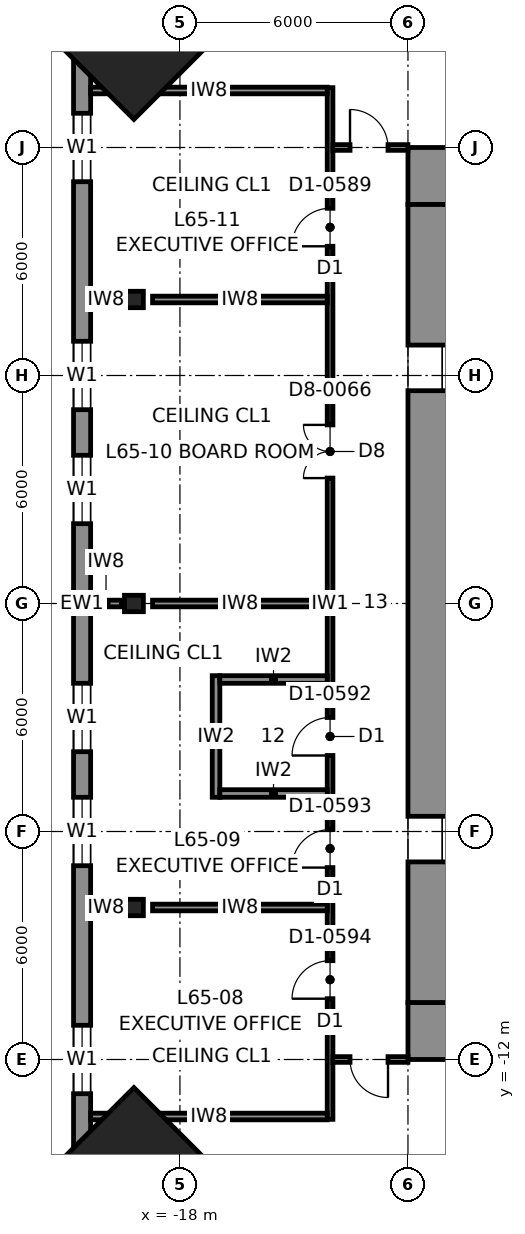
"""IFC4 building model, lengths in metres.
Left out: names, types, materials, properties, quantities, classifications, styles, units other than length and angle.
Written with IfcOpenShell. Run it as: python <this file> out.ifc"""

import sys

from ifc_helpers import new_model, si_unit, direction, frame, frame_2d, origin, origin_2d, place, context, subcontext, project, spatial, rectangle, i_section, extrude, element, fill, save


model = new_model("IFC4")
c1 = context("Model", 3, precision=1e-05, world=origin(), true_north=direction((0.0, 1.0)))
c2 = subcontext(c1, "Body", "Model", "MODEL_VIEW")
j1 = project(units=[si_unit("LENGTHUNIT", "METRE"), si_unit("PLANEANGLEUNIT", "RADIAN")], contexts=[c1])
p1 = place(None, origin())
s1 = spatial("IfcSite", under=j1, at=p1, CompositionType="ELEMENT")
p2 = place(p1, origin())
s2 = spatial("IfcBuilding", under=s1, at=p2, CompositionType="ELEMENT")
p3 = place(p2, frame((0.0, 0.0, 289.8)))
s3 = spatial("IfcBuildingStorey", under=s2, at=p3, CompositionType="ELEMENT", Elevation=289.8)
for number, where, z_axis, x_axis in (
    (1, (-19.211, -14.861, 0.0), (0.04, 0.04, 0.998), (-0.708, 0.707, 0.0)),
    (2, (-19.211, 14.861, 0.0), (0.04, -0.04, 0.998), (0.708, 0.707, 0.0)),
):
    element("IfcColumn", number, at=place(p3, frame(where, z_axis=z_axis, x_axis=x_axis)), inside=s3, PredefinedType="COLUMN", context=c2, shape_type="SweptSolid", body=[
        extrude(rectangle(XDim=3.0, YDim=3.0, at=origin_2d()), origin(), (0.0, 0.0, 1.0), 4.007),
    ])
for number, where, z_axis, x_axis in (
    (3, (-19.211, 0.0, 0.0), (0.04, 0.0, 0.999), (0.0, 1.0, 0.0)),
    (4, (-19.211, 8.0, 0.0), (0.04, 0.0, 0.999), (0.0, 1.0, 0.0)),
    (5, (-19.211, -8.0, 0.0), (0.04, 0.0, 0.999), (0.0, 1.0, 0.0)),
):
    element("IfcColumn", number, at=place(p3, frame(where, z_axis=z_axis, x_axis=x_axis)), inside=s3, PredefinedType="COLUMN", context=c2, shape_type="SweptSolid", body=[
        extrude(i_section(OverallWidth=0.432, OverallDepth=0.498, WebThickness=0.056, FlangeThickness=0.089, at=origin_2d()), origin(), (0.0, 0.0, 1.0), 4.003),
    ])
for number, where, z_axis, x_axis in (
    (6, (-12.0, 11.25, 0.0), (0.0, 0.0, 1.0), (1.0, 0.0, 0.0)),
    (7, (12.0, -11.25, 0.0), (0.0, 0.0, 1.0), (-1.0, 0.0, 0.0)),
):
    element("IfcWall", number, at=place(p3, frame(where, z_axis=z_axis, x_axis=x_axis)), inside=s3, PredefinedType="SHEAR", context=c2, shape_type="SweptSolid", body=[
        extrude(rectangle(XDim=24.0, YDim=1.5, at=frame_2d((12.0, 0.0))), origin(), (0.0, 0.0, 1.0), 4.0),
    ])
p4 = place(p3, frame((-11.25, -10.5, 0.0), z_axis=(0.0, 0.0, 1.0), x_axis=(0.0, 1.0, 0.0)))
e8 = element("IfcWall", 8, at=p4, inside=s3, PredefinedType="SHEAR", context=c2, shape_type="SweptSolid", body=[
    extrude(rectangle(XDim=21.0, YDim=1.5, at=frame_2d((10.5, 0.0))), origin(), (0.0, 0.0, 1.0), 4.0),
])
p5 = place(p4, frame((16.1, 0.0, 0.0)))
e9 = element("IfcOpeningElement", 9, at=p5, cuts=e8, PredefinedType="OPENING", context=c2, shape_type="SweptSolid", body=[
    extrude(rectangle(XDim=1.2, YDim=2.3, at=frame_2d((0.6, 1.15))), frame((0.0, 0.76, 0.0), z_axis=(0.0, -1.0, 0.0), x_axis=(1.0, 0.0, 0.0)), (0.0, 0.0, 1.0), 1.52),
])
p6 = place(p4, frame((3.7, 0.0, 0.0)))
e10 = element("IfcOpeningElement", 10, at=p6, cuts=e8, PredefinedType="OPENING", context=c2, shape_type="SweptSolid", body=[
    extrude(rectangle(XDim=1.2, YDim=2.3, at=frame_2d((0.6, 1.15))), frame((0.0, 0.76, 0.0), z_axis=(0.0, -1.0, 0.0), x_axis=(1.0, 0.0, 0.0)), (0.0, 0.0, 1.0), 1.52),
])
p7 = place(p3, frame((-20.575, 16.3, 0.0), z_axis=(0.0, 0.0, 1.0), x_axis=(0.0, -1.0, 0.0)))
e11 = element("IfcWall", 11, at=p7, inside=s3, PredefinedType="SOLIDWALL", context=c2, shape_type="SweptSolid", body=[
    extrude(rectangle(XDim=32.6, YDim=0.45, at=frame_2d((16.3, 0.0))), origin(), (0.0, 0.0, 1.0), 3.83),
])
p8 = place(p7, frame((3.4, 0.0, 0.7)))
e12 = element("IfcOpeningElement", 12, at=p8, cuts=e11, PredefinedType="OPENING", context=c2, shape_type="SweptSolid", body=[
    extrude(rectangle(XDim=1.8, YDim=2.6, at=frame_2d((0.9, 1.3))), frame((0.0, 0.235, 0.0), z_axis=(0.0, -1.0, 0.0), x_axis=(1.0, 0.0, 0.0)), (0.0, 0.0, 1.0), 0.47),
])
p9 = place(p7, frame((9.4, 0.0, 0.7)))
e13 = element("IfcOpeningElement", 13, at=p9, cuts=e11, PredefinedType="OPENING", context=c2, shape_type="SweptSolid", body=[
    extrude(rectangle(XDim=1.8, YDim=2.6, at=frame_2d((0.9, 1.3))), frame((0.0, 0.235, 0.0), z_axis=(0.0, -1.0, 0.0), x_axis=(1.0, 0.0, 0.0)), (0.0, 0.0, 1.0), 0.47),
])
p10 = place(p7, frame((12.4, 0.0, 0.7)))
e14 = element("IfcOpeningElement", 14, at=p10, cuts=e11, PredefinedType="OPENING", context=c2, shape_type="SweptSolid", body=[
    extrude(rectangle(XDim=1.8, YDim=2.6, at=frame_2d((0.9, 1.3))), frame((0.0, 0.235, 0.0), z_axis=(0.0, -1.0, 0.0), x_axis=(1.0, 0.0, 0.0)), (0.0, 0.0, 1.0), 0.47),
])
p11 = place(p7, frame((18.4, 0.0, 0.7)))
e15 = element("IfcOpeningElement", 15, at=p11, cuts=e11, PredefinedType="OPENING", context=c2, shape_type="SweptSolid", body=[
    extrude(rectangle(XDim=1.8, YDim=2.6, at=frame_2d((0.9, 1.3))), frame((0.0, 0.235, 0.0), z_axis=(0.0, -1.0, 0.0), x_axis=(1.0, 0.0, 0.0)), (0.0, 0.0, 1.0), 0.47),
])
p12 = place(p7, frame((21.4, 0.0, 0.7)))
e16 = element("IfcOpeningElement", 16, at=p12, cuts=e11, PredefinedType="OPENING", context=c2, shape_type="SweptSolid", body=[
    extrude(rectangle(XDim=1.8, YDim=2.6, at=frame_2d((0.9, 1.3))), frame((0.0, 0.235, 0.0), z_axis=(0.0, -1.0, 0.0), x_axis=(1.0, 0.0, 0.0)), (0.0, 0.0, 1.0), 0.47),
])
p13 = place(p7, frame((27.4, 0.0, 0.7)))
e17 = element("IfcOpeningElement", 17, at=p13, cuts=e11, PredefinedType="OPENING", context=c2, shape_type="SweptSolid", body=[
    extrude(rectangle(XDim=1.8, YDim=2.6, at=frame_2d((0.9, 1.3))), frame((0.0, 0.235, 0.0), z_axis=(0.0, -1.0, 0.0), x_axis=(1.0, 0.0, 0.0)), (0.0, 0.0, 1.0), 0.47),
])
p14 = place(p3, frame((-14.05, 13.575, 0.0), z_axis=(0.0, 0.0, 1.0), x_axis=(0.0, -1.0, 0.0)))
e18 = element("IfcWall", 18, at=p14, inside=s3, PredefinedType="PARTITIONING", context=c2, shape_type="SweptSolid", body=[
    extrude(rectangle(XDim=27.15, YDim=0.15, at=frame_2d((13.575, 0.0))), origin(), (0.0, 0.0, 1.0), 3.83),
])
p15 = place(p14, frame((22.975, 0.0, 0.0)))
e19 = element("IfcOpeningElement", 19, at=p15, cuts=e18, PredefinedType="OPENING", context=c2, shape_type="SweptSolid", body=[
    extrude(rectangle(XDim=1.0, YDim=2.3, at=frame_2d((0.5, 1.15))), frame((0.0, 0.085, 0.0), z_axis=(0.0, -1.0, 0.0), x_axis=(1.0, 0.0, 0.0)), (0.0, 0.0, 1.0), 0.17),
])
p16 = place(p14, frame((19.525, 0.0, 0.0)))
e20 = element("IfcOpeningElement", 20, at=p16, cuts=e18, PredefinedType="OPENING", context=c2, shape_type="SweptSolid", body=[
    extrude(rectangle(XDim=1.0, YDim=2.3, at=frame_2d((0.5, 1.15))), frame((0.0, 0.085, 0.0), z_axis=(0.0, -1.0, 0.0), x_axis=(1.0, 0.0, 0.0)), (0.0, 0.0, 1.0), 0.17),
])
p17 = place(p14, frame((8.875, 0.0, 0.0)))
e21 = element("IfcOpeningElement", 21, at=p17, cuts=e18, PredefinedType="OPENING", context=c2, shape_type="SweptSolid", body=[
    extrude(rectangle(XDim=1.4, YDim=2.3, at=frame_2d((0.7, 1.15))), frame((0.0, 0.085, 0.0), z_axis=(0.0, -1.0, 0.0), x_axis=(1.0, 0.0, 0.0)), (0.0, 0.0, 1.0), 0.17),
])
p18 = place(p14, frame((3.175, 0.0, 0.0)))
e22 = element("IfcOpeningElement", 22, at=p18, cuts=e18, PredefinedType="OPENING", context=c2, shape_type="SweptSolid", body=[
    extrude(rectangle(XDim=1.0, YDim=2.3, at=frame_2d((0.5, 1.15))), frame((0.0, 0.085, 0.0), z_axis=(0.0, -1.0, 0.0), x_axis=(1.0, 0.0, 0.0)), (0.0, 0.0, 1.0), 0.17),
])
p19 = place(p14, frame((16.575, 0.0, 0.0)))
e23 = element("IfcOpeningElement", 23, at=p19, cuts=e18, PredefinedType="OPENING", context=c2, shape_type="SweptSolid", body=[
    extrude(rectangle(XDim=1.0, YDim=2.3, at=frame_2d((0.5, 1.15))), frame((0.0, 0.085, 0.0), z_axis=(0.0, -1.0, 0.0), x_axis=(1.0, 0.0, 0.0)), (0.0, 0.0, 1.0), 0.17),
])
p20 = place(p3, frame((-13.975, 12.0, 0.0), z_axis=(0.0, 0.0, 1.0), x_axis=(1.0, 0.0, 0.0)))
e24 = element("IfcWall", 24, at=p20, inside=s3, PredefinedType="PARTITIONING", context=c2, shape_type="SweptSolid", body=[
    extrude(rectangle(XDim=1.975, YDim=0.15, at=frame_2d((0.988, 0.0))), origin(), (0.0, 0.0, 1.0), 3.83),
])
p21 = place(p20, frame((0.45, 0.0, 0.0)))
e25 = element("IfcOpeningElement", 25, at=p21, cuts=e24, PredefinedType="OPENING", context=c2, shape_type="SweptSolid", body=[
    extrude(rectangle(XDim=1.0, YDim=2.3, at=frame_2d((0.5, 1.15))), frame((0.0, 0.085, 0.0), z_axis=(0.0, -1.0, 0.0), x_axis=(1.0, 0.0, 0.0)), (0.0, 0.0, 1.0), 0.17),
])
p22 = place(p3, frame((-12.0, -12.0, 0.0), z_axis=(0.0, 0.0, 1.0), x_axis=(-1.0, 0.0, 0.0)))
e26 = element("IfcWall", 26, at=p22, inside=s3, PredefinedType="PARTITIONING", context=c2, shape_type="SweptSolid", body=[
    extrude(rectangle(XDim=1.975, YDim=0.15, at=frame_2d((0.988, 0.0))), origin(), (0.0, 0.0, 1.0), 3.83),
])
p23 = place(p22, frame((0.525, 0.0, 0.0)))
e27 = element("IfcOpeningElement", 27, at=p23, cuts=e26, PredefinedType="OPENING", context=c2, shape_type="SweptSolid", body=[
    extrude(rectangle(XDim=1.0, YDim=2.3, at=frame_2d((0.5, 1.15))), frame((0.0, 0.085, 0.0), z_axis=(0.0, -1.0, 0.0), x_axis=(1.0, 0.0, 0.0)), (0.0, 0.0, 1.0), 0.17),
])
for number, where, z_axis, x_axis in (
    (28, (-20.35, 13.5, 0.0), (0.0, 0.0, 1.0), (1.0, 0.0, 0.0)),
    (29, (-14.125, -13.5, 0.0), (0.0, 0.0, 1.0), (-1.0, 0.0, 0.0)),
):
    element("IfcWall", number, at=place(p3, frame(where, z_axis=z_axis, x_axis=x_axis)), inside=s3, PredefinedType="PARTITIONING", context=c2, shape_type="SweptSolid", body=[
        extrude(rectangle(XDim=6.225, YDim=0.175, at=frame_2d((3.113, 0.0))), origin(), (0.0, 0.0, 1.0), 3.83),
    ])
p24 = place(p3, frame((-14.125, -8.0, 0.0), z_axis=(0.0, 0.0, 1.0), x_axis=(-1.0, 0.0, 0.0)))
e30 = element("IfcWall", 30, at=p24, inside=s3, PredefinedType="PARTITIONING", context=c2, shape_type="SweptSolid", body=[
    extrude(rectangle(XDim=4.595, YDim=0.175, at=frame_2d((2.298, 0.0))), origin(), (0.0, 0.0, 1.0), 3.016),
])
p25 = place(p3, frame((-19.541, -8.0, 0.0), z_axis=(0.0, 0.0, 1.0), x_axis=(-1.0, 0.0, 0.0)))
e31 = element("IfcWall", 31, at=p25, inside=s3, PredefinedType="PARTITIONING", context=c2, shape_type="SweptSolid", body=[
    extrude(rectangle(XDim=0.809, YDim=0.175, at=frame_2d((0.405, 0.0))), origin(), (0.0, 0.0, 1.0), 3.83),
])
p26 = place(p3, frame((-14.125, 0.0, 0.0), z_axis=(0.0, 0.0, 1.0), x_axis=(-1.0, 0.0, 0.0)))
e32 = element("IfcWall", 32, at=p26, inside=s3, PredefinedType="PARTITIONING", context=c2, shape_type="SweptSolid", body=[
    extrude(rectangle(XDim=4.595, YDim=0.175, at=frame_2d((2.298, 0.0))), origin(), (0.0, 0.0, 1.0), 3.016),
])
p27 = place(p3, frame((-19.541, 0.0, 0.0), z_axis=(0.0, 0.0, 1.0), x_axis=(-1.0, 0.0, 0.0)))
e33 = element("IfcWall", 33, at=p27, inside=s3, PredefinedType="PARTITIONING", context=c2, shape_type="SweptSolid", body=[
    extrude(rectangle(XDim=0.809, YDim=0.175, at=frame_2d((0.405, 0.0))), origin(), (0.0, 0.0, 1.0), 3.83),
])
p28 = place(p3, frame((-14.125, 8.0, 0.0), z_axis=(0.0, 0.0, 1.0), x_axis=(-1.0, 0.0, 0.0)))
e34 = element("IfcWall", 34, at=p28, inside=s3, PredefinedType="PARTITIONING", context=c2, shape_type="SweptSolid", body=[
    extrude(rectangle(XDim=4.595, YDim=0.175, at=frame_2d((2.298, 0.0))), origin(), (0.0, 0.0, 1.0), 3.016),
])
p29 = place(p3, frame((-19.541, 8.0, 0.0), z_axis=(0.0, 0.0, 1.0), x_axis=(-1.0, 0.0, 0.0)))
e35 = element("IfcWall", 35, at=p29, inside=s3, PredefinedType="PARTITIONING", context=c2, shape_type="SweptSolid", body=[
    extrude(rectangle(XDim=0.809, YDim=0.175, at=frame_2d((0.405, 0.0))), origin(), (0.0, 0.0, 1.0), 3.83),
])
p30 = place(p3, frame((-17.05, -5.1, 0.0), z_axis=(0.0, 0.0, 1.0), x_axis=(0.0, 1.0, 0.0)))
e36 = element("IfcWall", 36, at=p30, inside=s3, PredefinedType="PARTITIONING", context=c2, shape_type="SweptSolid", body=[
    extrude(rectangle(XDim=3.2, YDim=0.2, at=frame_2d((1.6, 0.0))), origin(), (0.0, 0.0, 1.0), 3.83),
])
for number, where, z_axis, x_axis in (
    (37, (-14.125, -5.0, 0.0), (0.0, 0.0, 1.0), (-1.0, 0.0, 0.0)),
    (38, (-14.125, -2.0, 0.0), (0.0, 0.0, 1.0), (-1.0, 0.0, 0.0)),
):
    element("IfcWall", number, at=place(p3, frame(where, z_axis=z_axis, x_axis=x_axis)), inside=s3, PredefinedType="PARTITIONING", context=c2, shape_type="SweptSolid", body=[
        extrude(rectangle(XDim=2.825, YDim=0.2, at=frame_2d((1.413, 0.0))), origin(), (0.0, 0.0, 1.0), 3.83),
    ])
p31 = place(p8, origin())
e39 = element("IfcWindow", 39, at=p31, inside=s3, PartitioningType="SINGLE_PANEL", PredefinedType="WINDOW", context=c2, shape_type="SweptSolid", body=[
    extrude(rectangle(XDim=1.8, YDim=2.6, at=frame_2d((0.9, 1.3))), frame((0.0, 0.03, 0.0), z_axis=(0.0, -1.0, 0.0), x_axis=(1.0, 0.0, 0.0)), (0.0, 0.0, 1.0), 0.06),
])
fill(e12, e39)
p32 = place(p9, origin())
e40 = element("IfcWindow", 40, at=p32, inside=s3, PartitioningType="SINGLE_PANEL", PredefinedType="WINDOW", context=c2, shape_type="SweptSolid", body=[
    extrude(rectangle(XDim=1.8, YDim=2.6, at=frame_2d((0.9, 1.3))), frame((0.0, 0.03, 0.0), z_axis=(0.0, -1.0, 0.0), x_axis=(1.0, 0.0, 0.0)), (0.0, 0.0, 1.0), 0.06),
])
fill(e13, e40)
p33 = place(p10, origin())
e41 = element("IfcWindow", 41, at=p33, inside=s3, PartitioningType="SINGLE_PANEL", PredefinedType="WINDOW", context=c2, shape_type="SweptSolid", body=[
    extrude(rectangle(XDim=1.8, YDim=2.6, at=frame_2d((0.9, 1.3))), frame((0.0, 0.03, 0.0), z_axis=(0.0, -1.0, 0.0), x_axis=(1.0, 0.0, 0.0)), (0.0, 0.0, 1.0), 0.06),
])
fill(e14, e41)
p34 = place(p11, origin())
e42 = element("IfcWindow", 42, at=p34, inside=s3, PartitioningType="SINGLE_PANEL", PredefinedType="WINDOW", context=c2, shape_type="SweptSolid", body=[
    extrude(rectangle(XDim=1.8, YDim=2.6, at=frame_2d((0.9, 1.3))), frame((0.0, 0.03, 0.0), z_axis=(0.0, -1.0, 0.0), x_axis=(1.0, 0.0, 0.0)), (0.0, 0.0, 1.0), 0.06),
])
fill(e15, e42)
p35 = place(p12, origin())
e43 = element("IfcWindow", 43, at=p35, inside=s3, PartitioningType="SINGLE_PANEL", PredefinedType="WINDOW", context=c2, shape_type="SweptSolid", body=[
    extrude(rectangle(XDim=1.8, YDim=2.6, at=frame_2d((0.9, 1.3))), frame((0.0, 0.03, 0.0), z_axis=(0.0, -1.0, 0.0), x_axis=(1.0, 0.0, 0.0)), (0.0, 0.0, 1.0), 0.06),
])
fill(e16, e43)
p36 = place(p13, origin())
e44 = element("IfcWindow", 44, at=p36, inside=s3, PartitioningType="SINGLE_PANEL", PredefinedType="WINDOW", context=c2, shape_type="SweptSolid", body=[
    extrude(rectangle(XDim=1.8, YDim=2.6, at=frame_2d((0.9, 1.3))), frame((0.0, 0.03, 0.0), z_axis=(0.0, -1.0, 0.0), x_axis=(1.0, 0.0, 0.0)), (0.0, 0.0, 1.0), 0.06),
])
fill(e17, e44)
p37 = place(p21, origin())
e45 = element("IfcDoor", 45, at=p37, inside=s3, OperationType="SINGLE_SWING_LEFT", PredefinedType="DOOR", context=c2, shape_type="SweptSolid", body=[
    extrude(rectangle(XDim=1.0, YDim=2.3, at=frame_2d((0.5, 1.15))), frame((0.0, 0.025, 0.0), z_axis=(0.0, -1.0, 0.0), x_axis=(1.0, 0.0, 0.0)), (0.0, 0.0, 1.0), 0.05),
])
fill(e25, e45)
p38 = place(p23, origin())
e46 = element("IfcDoor", 46, at=p38, inside=s3, OperationType="SINGLE_SWING_LEFT", PredefinedType="DOOR", context=c2, shape_type="SweptSolid", body=[
    extrude(rectangle(XDim=1.0, YDim=2.3, at=frame_2d((0.5, 1.15))), frame((0.0, 0.025, 0.0), z_axis=(0.0, -1.0, 0.0), x_axis=(1.0, 0.0, 0.0)), (0.0, 0.0, 1.0), 0.05),
])
fill(e27, e46)
p39 = place(p15, frame((1.0, 0.0, 0.0), z_axis=(0.0, 0.0, 1.0), x_axis=(-1.0, 0.0, 0.0)))
e47 = element("IfcDoor", 47, at=p39, inside=s3, OperationType="SINGLE_SWING_LEFT", PredefinedType="DOOR", context=c2, shape_type="SweptSolid", body=[
    extrude(rectangle(XDim=1.0, YDim=2.3, at=frame_2d((0.5, 1.15))), frame((0.0, 0.025, 0.0), z_axis=(0.0, -1.0, 0.0), x_axis=(1.0, 0.0, 0.0)), (0.0, 0.0, 1.0), 0.05),
])
fill(e19, e47)
p40 = place(p16, frame((1.0, 0.0, 0.0), z_axis=(0.0, 0.0, 1.0), x_axis=(-1.0, 0.0, 0.0)))
e48 = element("IfcDoor", 48, at=p40, inside=s3, OperationType="SINGLE_SWING_LEFT", PredefinedType="DOOR", context=c2, shape_type="SweptSolid", body=[
    extrude(rectangle(XDim=1.0, YDim=2.3, at=frame_2d((0.5, 1.15))), frame((0.0, 0.025, 0.0), z_axis=(0.0, -1.0, 0.0), x_axis=(1.0, 0.0, 0.0)), (0.0, 0.0, 1.0), 0.05),
])
fill(e20, e48)
p41 = place(p17, frame((1.4, 0.0, 0.0), z_axis=(0.0, 0.0, 1.0), x_axis=(-1.0, 0.0, 0.0)))
e49 = element("IfcDoor", 49, at=p41, inside=s3, OperationType="DOUBLE_DOOR_SINGLE_SWING", PredefinedType="DOOR", context=c2, shape_type="SweptSolid", body=[
    extrude(rectangle(XDim=1.4, YDim=2.3, at=frame_2d((0.7, 1.15))), frame((0.0, 0.025, 0.0), z_axis=(0.0, -1.0, 0.0), x_axis=(1.0, 0.0, 0.0)), (0.0, 0.0, 1.0), 0.05),
])
fill(e21, e49)
p42 = place(p18, frame((1.0, 0.0, 0.0), z_axis=(0.0, 0.0, 1.0), x_axis=(-1.0, 0.0, 0.0)))
e50 = element("IfcDoor", 50, at=p42, inside=s3, OperationType="SINGLE_SWING_LEFT", PredefinedType="DOOR", context=c2, shape_type="SweptSolid", body=[
    extrude(rectangle(XDim=1.0, YDim=2.3, at=frame_2d((0.5, 1.15))), frame((0.0, 0.025, 0.0), z_axis=(0.0, -1.0, 0.0), x_axis=(1.0, 0.0, 0.0)), (0.0, 0.0, 1.0), 0.05),
])
fill(e22, e50)
p43 = place(p19, frame((1.0, 0.0, 0.0), z_axis=(0.0, 0.0, 1.0), x_axis=(-1.0, 0.0, 0.0)))
e51 = element("IfcDoor", 51, at=p43, inside=s3, OperationType="SINGLE_SWING_LEFT", PredefinedType="DOOR", context=c2, shape_type="SweptSolid", body=[
    extrude(rectangle(XDim=1.0, YDim=2.3, at=frame_2d((0.5, 1.15))), frame((0.0, 0.025, 0.0), z_axis=(0.0, -1.0, 0.0), x_axis=(1.0, 0.0, 0.0)), (0.0, 0.0, 1.0), 0.05),
])
fill(e23, e51)
p44 = place(p5, frame((1.2, 0.0, 0.0), z_axis=(0.0, 0.0, 1.0), x_axis=(-1.0, 0.0, 0.0)))
e52 = element("IfcDoor", 52, at=p44, inside=s3, OperationType="SINGLE_SWING_LEFT", PredefinedType="DOOR", context=c2, shape_type="SweptSolid", body=[
    extrude(rectangle(XDim=1.2, YDim=2.3, at=frame_2d((0.6, 1.15))), frame((0.0, 0.025, 0.0), z_axis=(0.0, -1.0, 0.0), x_axis=(1.0, 0.0, 0.0)), (0.0, 0.0, 1.0), 0.05),
])
fill(e9, e52)
p45 = place(p6, frame((1.2, 0.0, 0.0), z_axis=(0.0, 0.0, 1.0), x_axis=(-1.0, 0.0, 0.0)))
e53 = element("IfcDoor", 53, at=p45, inside=s3, OperationType="SINGLE_SWING_LEFT", PredefinedType="DOOR", context=c2, shape_type="SweptSolid", body=[
    extrude(rectangle(XDim=1.2, YDim=2.3, at=frame_2d((0.6, 1.15))), frame((0.0, 0.025, 0.0), z_axis=(0.0, -1.0, 0.0), x_axis=(1.0, 0.0, 0.0)), (0.0, 0.0, 1.0), 0.05),
])
fill(e10, e53)
save(model, sys.argv[1])
